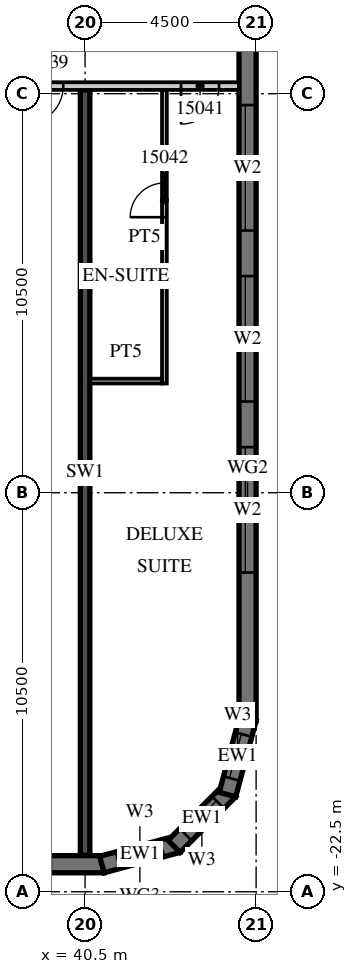
"""IFC4 building model, lengths in metres.
Left out: names, types, materials, properties, quantities, classifications, styles, units other than length and angle.
Written with IfcOpenShell. Run it as: python <this file> out.ifc"""

import sys

from ifc_helpers import new_model, si_unit, direction, frame, frame_2d, origin, place, context, subcontext, project, spatial, polyline, rectangle, outline, extrude, element, fill, save


model = new_model("IFC4")
c1 = context("Model", 3, precision=1e-05, world=origin(), true_north=direction((0.0, 1.0)))
c2 = subcontext(c1, "Body", "Model", "MODEL_VIEW")
j1 = project(units=[si_unit("LENGTHUNIT", "METRE"), si_unit("PLANEANGLEUNIT", "RADIAN")], contexts=[c1])
p1 = place(None, origin())
s1 = spatial("IfcSite", under=j1, at=p1, CompositionType="ELEMENT")
p2 = place(p1, origin())
s2 = spatial("IfcBuilding", under=s1, at=p2, CompositionType="ELEMENT")
p3 = place(p2, frame((0.0, 0.0, 79.8)))
s3 = spatial("IfcBuildingStorey", under=s2, at=p3, CompositionType="ELEMENT", Elevation=79.8)
p4 = place(p3, frame((40.5, -21.54, 0.0), z_axis=(0.0, 0.0, 1.0), x_axis=(0.0, 1.0, 0.0)))
e1 = element("IfcWall", 1, at=p4, inside=s3, PredefinedType="SHEAR", context=c2, shape_type="SweptSolid", body=[
    extrude(rectangle(XDim=20.14, YDim=0.25, at=frame_2d((10.07, 0.0))), origin(), (0.0, 0.0, 1.0), 3.3),
])
p5 = place(p3, frame((-13.5, -21.775, 0.0), z_axis=(0.0, 0.0, 1.0), x_axis=(1.0, 0.0, 0.0)))
e2 = element("IfcWall", 2, at=p5, inside=s3, PredefinedType="SOLIDWALL", context=c2, shape_type="SweptSolid", body=[
    extrude(rectangle(XDim=54.5, YDim=0.45, at=frame_2d((27.25, 0.0))), origin(), (0.0, 0.0, 1.0), 3.02),
])
p6 = place(p5, frame((0.9, 0.0, 0.45)))
e3 = element("IfcOpeningElement", 3, at=p6, cuts=e2, PredefinedType="OPENING", context=c2, shape_type="SweptSolid", body=[
    extrude(rectangle(XDim=2.7, YDim=2.25, at=frame_2d((1.35, 1.125))), frame((0.0, 0.235, 0.0), z_axis=(0.0, -1.0, 0.0), x_axis=(1.0, 0.0, 0.0)), (0.0, 0.0, 1.0), 0.47),
])
p7 = place(p5, frame((5.4, 0.0, 0.45)))
e4 = element("IfcOpeningElement", 4, at=p7, cuts=e2, PredefinedType="OPENING", context=c2, shape_type="SweptSolid", body=[
    extrude(rectangle(XDim=2.7, YDim=2.25, at=frame_2d((1.35, 1.125))), frame((0.0, 0.235, 0.0), z_axis=(0.0, -1.0, 0.0), x_axis=(1.0, 0.0, 0.0)), (0.0, 0.0, 1.0), 0.47),
])
p8 = place(p5, frame((9.9, 0.0, 0.45)))
e5 = element("IfcOpeningElement", 5, at=p8, cuts=e2, PredefinedType="OPENING", context=c2, shape_type="SweptSolid", body=[
    extrude(rectangle(XDim=2.7, YDim=2.25, at=frame_2d((1.35, 1.125))), frame((0.0, 0.235, 0.0), z_axis=(0.0, -1.0, 0.0), x_axis=(1.0, 0.0, 0.0)), (0.0, 0.0, 1.0), 0.47),
])
p9 = place(p5, frame((14.4, 0.0, 0.45)))
e6 = element("IfcOpeningElement", 6, at=p9, cuts=e2, PredefinedType="OPENING", context=c2, shape_type="SweptSolid", body=[
    extrude(rectangle(XDim=2.7, YDim=2.25, at=frame_2d((1.35, 1.125))), frame((0.0, 0.235, 0.0), z_axis=(0.0, -1.0, 0.0), x_axis=(1.0, 0.0, 0.0)), (0.0, 0.0, 1.0), 0.47),
])
p10 = place(p5, frame((18.9, 0.0, 0.45)))
e7 = element("IfcOpeningElement", 7, at=p10, cuts=e2, PredefinedType="OPENING", context=c2, shape_type="SweptSolid", body=[
    extrude(rectangle(XDim=2.7, YDim=2.25, at=frame_2d((1.35, 1.125))), frame((0.0, 0.235, 0.0), z_axis=(0.0, -1.0, 0.0), x_axis=(1.0, 0.0, 0.0)), (0.0, 0.0, 1.0), 0.47),
])
p11 = place(p5, frame((23.4, 0.0, 0.45)))
e8 = element("IfcOpeningElement", 8, at=p11, cuts=e2, PredefinedType="OPENING", context=c2, shape_type="SweptSolid", body=[
    extrude(rectangle(XDim=2.7, YDim=2.25, at=frame_2d((1.35, 1.125))), frame((0.0, 0.235, 0.0), z_axis=(0.0, -1.0, 0.0), x_axis=(1.0, 0.0, 0.0)), (0.0, 0.0, 1.0), 0.47),
])
p12 = place(p5, frame((27.9, 0.0, 0.45)))
e9 = element("IfcOpeningElement", 9, at=p12, cuts=e2, PredefinedType="OPENING", context=c2, shape_type="SweptSolid", body=[
    extrude(rectangle(XDim=2.7, YDim=2.25, at=frame_2d((1.35, 1.125))), frame((0.0, 0.235, 0.0), z_axis=(0.0, -1.0, 0.0), x_axis=(1.0, 0.0, 0.0)), (0.0, 0.0, 1.0), 0.47),
])
p13 = place(p5, frame((32.4, 0.0, 0.45)))
e10 = element("IfcOpeningElement", 10, at=p13, cuts=e2, PredefinedType="OPENING", context=c2, shape_type="SweptSolid", body=[
    extrude(rectangle(XDim=2.7, YDim=2.25, at=frame_2d((1.35, 1.125))), frame((0.0, 0.235, 0.0), z_axis=(0.0, -1.0, 0.0), x_axis=(1.0, 0.0, 0.0)), (0.0, 0.0, 1.0), 0.47),
])
p14 = place(p5, frame((36.9, 0.0, 0.45)))
e11 = element("IfcOpeningElement", 11, at=p14, cuts=e2, PredefinedType="OPENING", context=c2, shape_type="SweptSolid", body=[
    extrude(rectangle(XDim=2.7, YDim=2.25, at=frame_2d((1.35, 1.125))), frame((0.0, 0.235, 0.0), z_axis=(0.0, -1.0, 0.0), x_axis=(1.0, 0.0, 0.0)), (0.0, 0.0, 1.0), 0.47),
])
p15 = place(p5, frame((41.4, 0.0, 0.45)))
e12 = element("IfcOpeningElement", 12, at=p15, cuts=e2, PredefinedType="OPENING", context=c2, shape_type="SweptSolid", body=[
    extrude(rectangle(XDim=2.7, YDim=2.25, at=frame_2d((1.35, 1.125))), frame((0.0, 0.235, 0.0), z_axis=(0.0, -1.0, 0.0), x_axis=(1.0, 0.0, 0.0)), (0.0, 0.0, 1.0), 0.47),
])
p16 = place(p5, frame((45.9, 0.0, 0.45)))
e13 = element("IfcOpeningElement", 13, at=p16, cuts=e2, PredefinedType="OPENING", context=c2, shape_type="SweptSolid", body=[
    extrude(rectangle(XDim=2.7, YDim=2.25, at=frame_2d((1.35, 1.125))), frame((0.0, 0.235, 0.0), z_axis=(0.0, -1.0, 0.0), x_axis=(1.0, 0.0, 0.0)), (0.0, 0.0, 1.0), 0.47),
])
p17 = place(p5, frame((50.4, 0.0, 0.45)))
e14 = element("IfcOpeningElement", 14, at=p17, cuts=e2, PredefinedType="OPENING", context=c2, shape_type="SweptSolid", body=[
    extrude(rectangle(XDim=2.7, YDim=2.25, at=frame_2d((1.35, 1.125))), frame((0.0, 0.235, 0.0), z_axis=(0.0, -1.0, 0.0), x_axis=(1.0, 0.0, 0.0)), (0.0, 0.0, 1.0), 0.47),
])
p18 = place(p3, frame((40.942, -21.783, 0.0), z_axis=(0.0, 0.0, 1.0), x_axis=(0.965926999034, 0.25881466832, 0.0)))
e15 = element("IfcWall", 15, at=p18, inside=s3, PredefinedType="SOLIDWALL", context=c2, shape_type="SweptSolid", body=[
    extrude(outline(polyline([(0.0, -0.225), (2.071, -0.225), (1.95, 0.225), (0.121, 0.225), (0.0, -0.225)])), origin(), (0.0, 0.0, 1.0), 3.02),
])
p19 = place(p18, frame((0.435, 0.0, 0.45)))
e16 = element("IfcOpeningElement", 16, at=p19, cuts=e15, PredefinedType="OPENING", context=c2, shape_type="SweptSolid", body=[
    extrude(rectangle(XDim=1.2, YDim=2.25, at=frame_2d((0.6, 1.125))), frame((0.0, 0.235, 0.0), z_axis=(0.0, -1.0, 0.0), x_axis=(1.0, 0.0, 0.0)), (0.0, 0.0, 1.0), 0.47),
])
p20 = place(p3, frame((42.841, -21.305, 0.0), z_axis=(0.0, 0.0, 1.0), x_axis=(0.707106781187, 0.707106781187, 0.0)))
e17 = element("IfcWall", 17, at=p20, inside=s3, PredefinedType="SOLIDWALL", context=c2, shape_type="SweptSolid", body=[
    extrude(outline(polyline([(0.0, -0.225), (2.071, -0.225), (1.95, 0.225), (0.121, 0.225), (0.0, -0.225)])), origin(), (0.0, 0.0, 1.0), 3.02),
])
p21 = place(p20, frame((0.435, 0.0, 0.45)))
e18 = element("IfcOpeningElement", 18, at=p21, cuts=e17, PredefinedType="OPENING", context=c2, shape_type="SweptSolid", body=[
    extrude(rectangle(XDim=1.2, YDim=2.25, at=frame_2d((0.6, 1.125))), frame((0.0, 0.235, 0.0), z_axis=(0.0, -1.0, 0.0), x_axis=(1.0, 0.0, 0.0)), (0.0, 0.0, 1.0), 0.47),
])
p22 = place(p3, frame((44.247, -19.942, 0.0), z_axis=(0.0, 0.0, 1.0), x_axis=(0.25881466832, 0.965926999034, 0.0)))
e19 = element("IfcWall", 19, at=p22, inside=s3, PredefinedType="SOLIDWALL", context=c2, shape_type="SweptSolid", body=[
    extrude(outline(polyline([(-0.0, -0.225), (2.07, -0.225), (1.95, 0.225), (0.12, 0.225), (-0.0, -0.225)])), origin(), (0.0, 0.0, 1.0), 3.02),
])
p23 = place(p22, frame((0.435, 0.0, 0.45)))
e20 = element("IfcOpeningElement", 20, at=p23, cuts=e19, PredefinedType="OPENING", context=c2, shape_type="SweptSolid", body=[
    extrude(rectangle(XDim=1.2, YDim=2.25, at=frame_2d((0.6, 1.125))), frame((0.0, 0.235, 0.0), z_axis=(0.0, -1.0, 0.0), x_axis=(1.0, 0.0, 0.0)), (0.0, 0.0, 1.0), 0.47),
])
p24 = place(p3, frame((44.775, -18.0, 0.0), z_axis=(0.0, 0.0, 1.0), x_axis=(0.0, 1.0, 0.0)))
e21 = element("IfcWall", 21, at=p24, inside=s3, PredefinedType="SOLIDWALL", context=c2, shape_type="SweptSolid", body=[
    extrude(rectangle(XDim=36.0, YDim=0.45, at=frame_2d((18.0, 0.0))), origin(), (0.0, 0.0, 1.0), 3.02),
])
p25 = place(p24, frame((3.9, 0.0, 0.45)))
e22 = element("IfcOpeningElement", 22, at=p25, cuts=e21, PredefinedType="OPENING", context=c2, shape_type="SweptSolid", body=[
    extrude(rectangle(XDim=3.3, YDim=2.25, at=frame_2d((1.65, 1.125))), frame((0.0, 0.235, 0.0), z_axis=(0.0, -1.0, 0.0), x_axis=(1.0, 0.0, 0.0)), (0.0, 0.0, 1.0), 0.47),
])
p26 = place(p24, frame((8.4, 0.0, 0.45)))
e23 = element("IfcOpeningElement", 23, at=p26, cuts=e21, PredefinedType="OPENING", context=c2, shape_type="SweptSolid", body=[
    extrude(rectangle(XDim=3.3, YDim=2.25, at=frame_2d((1.65, 1.125))), frame((0.0, 0.235, 0.0), z_axis=(0.0, -1.0, 0.0), x_axis=(1.0, 0.0, 0.0)), (0.0, 0.0, 1.0), 0.47),
])
p27 = place(p24, frame((12.9, 0.0, 0.45)))
e24 = element("IfcOpeningElement", 24, at=p27, cuts=e21, PredefinedType="OPENING", context=c2, shape_type="SweptSolid", body=[
    extrude(rectangle(XDim=3.3, YDim=2.25, at=frame_2d((1.65, 1.125))), frame((0.0, 0.235, 0.0), z_axis=(0.0, -1.0, 0.0), x_axis=(1.0, 0.0, 0.0)), (0.0, 0.0, 1.0), 0.47),
])
p28 = place(p3, frame((-13.5, -1.3, 0.0), z_axis=(0.0, 0.0, 1.0), x_axis=(1.0, 0.0, 0.0)))
e25 = element("IfcWall", 25, at=p28, inside=s3, PredefinedType="PARTITIONING", context=c2, shape_type="SweptSolid", body=[
    extrude(rectangle(XDim=58.05, YDim=0.2, at=frame_2d((29.025, 0.0))), origin(), (0.0, 0.0, 1.0), 3.02),
])
p29 = place(p28, frame((2.925, 0.0, 0.0)))
e26 = element("IfcOpeningElement", 26, at=p29, cuts=e25, PredefinedType="OPENING", context=c2, shape_type="SweptSolid", body=[
    extrude(rectangle(XDim=1.0, YDim=2.1, at=frame_2d((0.5, 1.05))), frame((0.0, 0.11, 0.0), z_axis=(0.0, -1.0, 0.0), x_axis=(1.0, 0.0, 0.0)), (0.0, 0.0, 1.0), 0.22),
])
p30 = place(p28, frame((7.45, 0.0, 0.0)))
e27 = element("IfcOpeningElement", 27, at=p30, cuts=e25, PredefinedType="OPENING", context=c2, shape_type="SweptSolid", body=[
    extrude(rectangle(XDim=1.0, YDim=2.1, at=frame_2d((0.5, 1.05))), frame((0.0, 0.11, 0.0), z_axis=(0.0, -1.0, 0.0), x_axis=(1.0, 0.0, 0.0)), (0.0, 0.0, 1.0), 0.22),
])
p31 = place(p28, frame((11.925, 0.0, 0.0)))
e28 = element("IfcOpeningElement", 28, at=p31, cuts=e25, PredefinedType="OPENING", context=c2, shape_type="SweptSolid", body=[
    extrude(rectangle(XDim=1.0, YDim=2.1, at=frame_2d((0.5, 1.05))), frame((0.0, 0.11, 0.0), z_axis=(0.0, -1.0, 0.0), x_axis=(1.0, 0.0, 0.0)), (0.0, 0.0, 1.0), 0.22),
])
p32 = place(p28, frame((15.938, 0.0, 0.0)))
e29 = element("IfcOpeningElement", 29, at=p32, cuts=e25, PredefinedType="OPENING", context=c2, shape_type="SweptSolid", body=[
    extrude(rectangle(XDim=1.2, YDim=2.1, at=frame_2d((0.6, 1.05))), frame((0.0, 0.11, 0.0), z_axis=(0.0, -1.0, 0.0), x_axis=(1.0, 0.0, 0.0)), (0.0, 0.0, 1.0), 0.22),
])
p33 = place(p28, frame((25.45, 0.0, 0.0)))
e30 = element("IfcOpeningElement", 30, at=p33, cuts=e25, PredefinedType="OPENING", context=c2, shape_type="SweptSolid", body=[
    extrude(rectangle(XDim=1.0, YDim=2.1, at=frame_2d((0.5, 1.05))), frame((0.0, 0.11, 0.0), z_axis=(0.0, -1.0, 0.0), x_axis=(1.0, 0.0, 0.0)), (0.0, 0.0, 1.0), 0.22),
])
p34 = place(p28, frame((29.925, 0.0, 0.0)))
e31 = element("IfcOpeningElement", 31, at=p34, cuts=e25, PredefinedType="OPENING", context=c2, shape_type="SweptSolid", body=[
    extrude(rectangle(XDim=1.0, YDim=2.1, at=frame_2d((0.5, 1.05))), frame((0.0, 0.11, 0.0), z_axis=(0.0, -1.0, 0.0), x_axis=(1.0, 0.0, 0.0)), (0.0, 0.0, 1.0), 0.22),
])
p35 = place(p28, frame((36.862, 0.0, 0.0)))
e32 = element("IfcOpeningElement", 32, at=p35, cuts=e25, PredefinedType="OPENING", context=c2, shape_type="SweptSolid", body=[
    extrude(rectangle(XDim=1.2, YDim=2.1, at=frame_2d((0.6, 1.05))), frame((0.0, 0.11, 0.0), z_axis=(0.0, -1.0, 0.0), x_axis=(1.0, 0.0, 0.0)), (0.0, 0.0, 1.0), 0.22),
])
p36 = place(p28, frame((41.075, 0.0, 0.0)))
e33 = element("IfcOpeningElement", 33, at=p36, cuts=e25, PredefinedType="OPENING", context=c2, shape_type="SweptSolid", body=[
    extrude(rectangle(XDim=1.0, YDim=2.1, at=frame_2d((0.5, 1.05))), frame((0.0, 0.11, 0.0), z_axis=(0.0, -1.0, 0.0), x_axis=(1.0, 0.0, 0.0)), (0.0, 0.0, 1.0), 0.22),
])
p37 = place(p28, frame((45.55, 0.0, 0.0)))
e34 = element("IfcOpeningElement", 34, at=p37, cuts=e25, PredefinedType="OPENING", context=c2, shape_type="SweptSolid", body=[
    extrude(rectangle(XDim=1.0, YDim=2.1, at=frame_2d((0.5, 1.05))), frame((0.0, 0.11, 0.0), z_axis=(0.0, -1.0, 0.0), x_axis=(1.0, 0.0, 0.0)), (0.0, 0.0, 1.0), 0.22),
])
p38 = place(p28, frame((52.425, 0.0, 0.0)))
e35 = element("IfcOpeningElement", 35, at=p38, cuts=e25, PredefinedType="OPENING", context=c2, shape_type="SweptSolid", body=[
    extrude(rectangle(XDim=1.0, YDim=2.1, at=frame_2d((0.5, 1.05))), frame((0.0, 0.11, 0.0), z_axis=(0.0, -1.0, 0.0), x_axis=(1.0, 0.0, 0.0)), (0.0, 0.0, 1.0), 0.22),
])
p39 = place(p28, frame((56.525, 0.0, 0.0)))
e36 = element("IfcOpeningElement", 36, at=p39, cuts=e25, PredefinedType="OPENING", context=c2, shape_type="SweptSolid", body=[
    extrude(rectangle(XDim=1.0, YDim=2.1, at=frame_2d((0.5, 1.05))), frame((0.0, 0.11, 0.0), z_axis=(0.0, -1.0, 0.0), x_axis=(1.0, 0.0, 0.0)), (0.0, 0.0, 1.0), 0.22),
])
p40 = place(p3, frame((42.587, -9.125, 0.0), z_axis=(0.0, 0.0, 1.0), x_axis=(0.0, 1.0, 0.0)))
e37 = element("IfcWall", 37, at=p40, inside=s3, PredefinedType="PARTITIONING", context=c2, shape_type="SweptSolid", body=[
    extrude(rectangle(XDim=7.725, YDim=0.125, at=frame_2d((3.863, 0.0))), origin(), (0.0, 0.0, 1.0), 3.02),
])
p41 = place(p40, frame((4.375, 0.0, 0.0)))
e38 = element("IfcOpeningElement", 38, at=p41, cuts=e37, PredefinedType="OPENING", context=c2, shape_type="SweptSolid", body=[
    extrude(rectangle(XDim=0.9, YDim=2.1, at=frame_2d((0.45, 1.05))), frame((0.0, 0.073, 0.0), z_axis=(0.0, -1.0, 0.0), x_axis=(1.0, 0.0, 0.0)), (0.0, 0.0, 1.0), 0.145),
])
p42 = place(p3, frame((40.625, -9.062, 0.0), z_axis=(0.0, 0.0, 1.0), x_axis=(1.0, 0.0, 0.0)))
e39 = element("IfcWall", 39, at=p42, inside=s3, PredefinedType="PARTITIONING", context=c2, shape_type="SweptSolid", body=[
    extrude(rectangle(XDim=1.9, YDim=0.125, at=frame_2d((0.95, 0.0))), origin(), (0.0, 0.0, 1.0), 3.02),
])
p43 = place(p19, origin())
e40 = element("IfcWindow", 40, at=p43, inside=s3, PartitioningType="SINGLE_PANEL", PredefinedType="WINDOW", context=c2, shape_type="SweptSolid", body=[
    extrude(rectangle(XDim=1.2, YDim=2.25, at=frame_2d((0.6, 1.125))), frame((0.0, 0.09, 0.0), z_axis=(0.0, -1.0, 0.0), x_axis=(1.0, 0.0, 0.0)), (0.0, 0.0, 1.0), 0.06),
])
fill(e16, e40)
p44 = place(p21, origin())
e41 = element("IfcWindow", 41, at=p44, inside=s3, PartitioningType="SINGLE_PANEL", PredefinedType="WINDOW", context=c2, shape_type="SweptSolid", body=[
    extrude(rectangle(XDim=1.2, YDim=2.25, at=frame_2d((0.6, 1.125))), frame((0.0, 0.09, 0.0), z_axis=(0.0, -1.0, 0.0), x_axis=(1.0, 0.0, 0.0)), (0.0, 0.0, 1.0), 0.06),
])
fill(e18, e41)
p45 = place(p23, origin())
e42 = element("IfcWindow", 42, at=p45, inside=s3, PartitioningType="SINGLE_PANEL", PredefinedType="WINDOW", context=c2, shape_type="SweptSolid", body=[
    extrude(rectangle(XDim=1.2, YDim=2.25, at=frame_2d((0.6, 1.125))), frame((0.0, 0.09, 0.0), z_axis=(0.0, -1.0, 0.0), x_axis=(1.0, 0.0, 0.0)), (0.0, 0.0, 1.0), 0.06),
])
fill(e20, e42)
p46 = place(p25, origin())
e43 = element("IfcWindow", 43, at=p46, inside=s3, PartitioningType="SINGLE_PANEL", PredefinedType="WINDOW", context=c2, shape_type="SweptSolid", body=[
    extrude(rectangle(XDim=3.3, YDim=2.25, at=frame_2d((1.65, 1.125))), frame((0.0, 0.09, 0.0), z_axis=(0.0, -1.0, 0.0), x_axis=(1.0, 0.0, 0.0)), (0.0, 0.0, 1.0), 0.06),
])
fill(e22, e43)
p47 = place(p26, origin())
e44 = element("IfcWindow", 44, at=p47, inside=s3, PartitioningType="SINGLE_PANEL", PredefinedType="WINDOW", context=c2, shape_type="SweptSolid", body=[
    extrude(rectangle(XDim=3.3, YDim=2.25, at=frame_2d((1.65, 1.125))), frame((0.0, 0.09, 0.0), z_axis=(0.0, -1.0, 0.0), x_axis=(1.0, 0.0, 0.0)), (0.0, 0.0, 1.0), 0.06),
])
fill(e23, e44)
p48 = place(p27, origin())
e45 = element("IfcWindow", 45, at=p48, inside=s3, PartitioningType="SINGLE_PANEL", PredefinedType="WINDOW", context=c2, shape_type="SweptSolid", body=[
    extrude(rectangle(XDim=3.3, YDim=2.25, at=frame_2d((1.65, 1.125))), frame((0.0, 0.09, 0.0), z_axis=(0.0, -1.0, 0.0), x_axis=(1.0, 0.0, 0.0)), (0.0, 0.0, 1.0), 0.06),
])
fill(e24, e45)
p49 = place(p38, origin())
e46 = element("IfcDoor", 46, at=p49, inside=s3, OperationType="SINGLE_SWING_LEFT", PredefinedType="DOOR", context=c2, shape_type="SweptSolid", body=[
    extrude(rectangle(XDim=1.0, YDim=2.1, at=frame_2d((0.5, 1.05))), frame((0.0, 0.025, 0.0), z_axis=(0.0, -1.0, 0.0), x_axis=(1.0, 0.0, 0.0)), (0.0, 0.0, 1.0), 0.05),
])
fill(e35, e46)
p50 = place(p39, origin())
e47 = element("IfcDoor", 47, at=p50, inside=s3, OperationType="SINGLE_SWING_LEFT", PredefinedType="DOOR", context=c2, shape_type="SweptSolid", body=[
    extrude(rectangle(XDim=1.0, YDim=2.1, at=frame_2d((0.5, 1.05))), frame((0.0, 0.025, 0.0), z_axis=(0.0, -1.0, 0.0), x_axis=(1.0, 0.0, 0.0)), (0.0, 0.0, 1.0), 0.05),
])
fill(e36, e47)
p51 = place(p41, origin())
e48 = element("IfcDoor", 48, at=p51, inside=s3, OperationType="SINGLE_SWING_LEFT", PredefinedType="DOOR", context=c2, shape_type="SweptSolid", body=[
    extrude(rectangle(XDim=0.9, YDim=2.1, at=frame_2d((0.45, 1.05))), frame((0.0, 0.025, 0.0), z_axis=(0.0, -1.0, 0.0), x_axis=(1.0, 0.0, 0.0)), (0.0, 0.0, 1.0), 0.05),
])
fill(e38, e48)
save(model, sys.argv[1])
